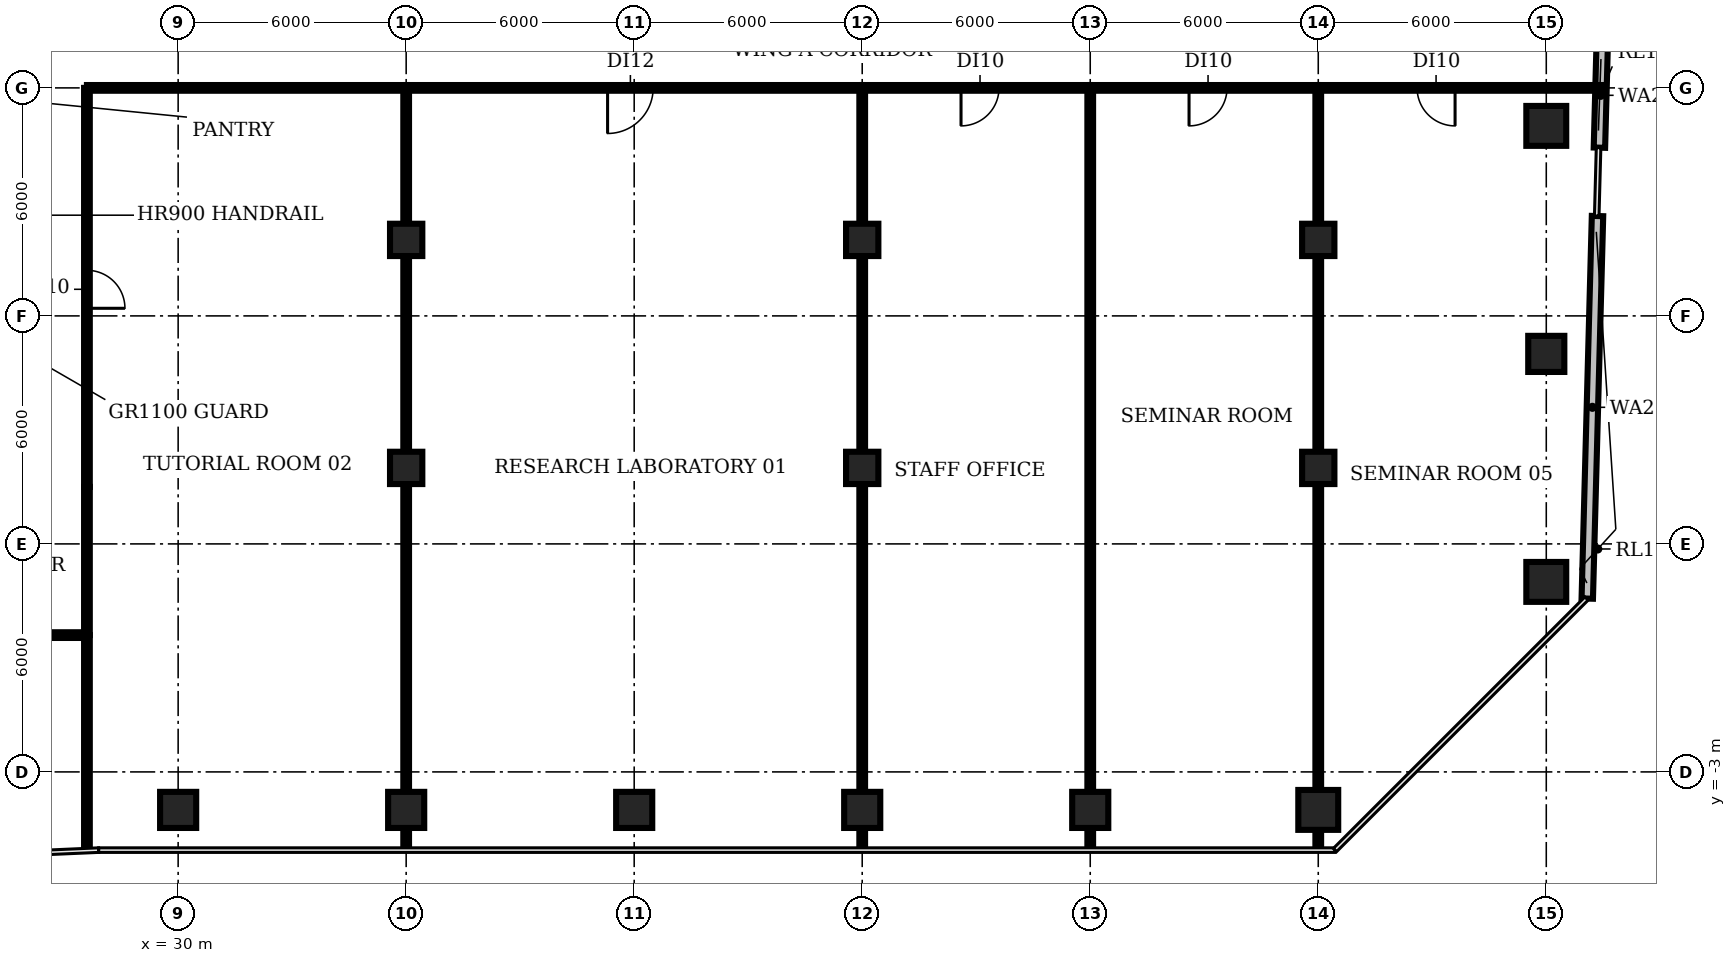
"""IFC4 building model, lengths in metres.
Left out: names, types, materials, properties, quantities, classifications, styles, units other than length and angle.
Written with IfcOpenShell. Run it as: python <this file> out.ifc"""

import sys

from ifc_helpers import new_model, si_unit, direction, frame, frame_2d, origin, origin_2d, place, context, subcontext, project, spatial, rectangle, circle, extrude, element, fill, save


model = new_model("IFC4")
c1 = context("Model", 3, precision=1e-05, world=origin(), true_north=direction((0.0, 1.0)))
c2 = subcontext(c1, "Body", "Model", "MODEL_VIEW")
j1 = project(units=[si_unit("LENGTHUNIT", "METRE"), si_unit("PLANEANGLEUNIT", "RADIAN")], contexts=[c1])
p1 = place(None, origin())
s1 = spatial("IfcSite", under=j1, at=p1, CompositionType="ELEMENT")
p2 = place(p1, origin())
s2 = spatial("IfcBuilding", under=s1, at=p2, CompositionType="ELEMENT")
p3 = place(p2, frame((0.0, 0.0, 62.6)))
s3 = spatial("IfcBuildingStorey", under=s2, at=p3, CompositionType="ELEMENT", Elevation=62.6)
for number, where, z_axis, x_axis in (
    (1, (30.0, -4.0, 0.0), (0.0, 0.0, 1.0), (1.0, 0.0, 0.0)),
    (2, (36.0, -4.0, 0.0), (0.0, 0.0, 1.0), (1.0, 0.0, 0.0)),
):
    element("IfcColumn", number, at=place(p3, frame(where, z_axis=z_axis, x_axis=x_axis)), inside=s3, PredefinedType="COLUMN", context=c2, shape_type="SweptSolid", body=[
        extrude(rectangle(XDim=0.95, YDim=0.95, at=origin_2d()), origin(), (0.0, 0.0, 1.0), 3.85),
    ])
for number, where, z_axis, x_axis in (
    (3, (36.0, 5.0, 0.0), (0.0, 0.0, 1.0), (1.0, 0.0, 0.0)),
    (4, (36.0, 11.0, 0.0), (0.0, 0.0, 1.0), (1.0, 0.0, 0.0)),
):
    element("IfcColumn", number, at=place(p3, frame(where, z_axis=z_axis, x_axis=x_axis)), inside=s3, PredefinedType="COLUMN", context=c2, shape_type="SweptSolid", body=[
        extrude(rectangle(XDim=0.85, YDim=0.85, at=origin_2d()), origin(), (0.0, 0.0, 1.0), 3.85),
    ])
for number, where, z_axis, x_axis in (
    (5, (42.0, -4.0, 0.0), (0.0, 0.0, 1.0), (1.0, 0.0, 0.0)),
    (6, (48.0, -4.0, 0.0), (0.0, 0.0, 1.0), (1.0, 0.0, 0.0)),
):
    element("IfcColumn", number, at=place(p3, frame(where, z_axis=z_axis, x_axis=x_axis)), inside=s3, PredefinedType="COLUMN", context=c2, shape_type="SweptSolid", body=[
        extrude(rectangle(XDim=0.95, YDim=0.95, at=origin_2d()), origin(), (0.0, 0.0, 1.0), 3.85),
    ])
for number, where, z_axis, x_axis in (
    (7, (48.0, 5.0, 0.0), (0.0, 0.0, 1.0), (1.0, 0.0, 0.0)),
    (8, (48.0, 11.0, 0.0), (0.0, 0.0, 1.0), (1.0, 0.0, 0.0)),
):
    element("IfcColumn", number, at=place(p3, frame(where, z_axis=z_axis, x_axis=x_axis)), inside=s3, PredefinedType="COLUMN", context=c2, shape_type="SweptSolid", body=[
        extrude(rectangle(XDim=0.85, YDim=0.85, at=origin_2d()), origin(), (0.0, 0.0, 1.0), 3.85),
    ])
p4 = place(p3, frame((54.0, -4.0, 0.0), z_axis=(0.0, 0.0, 1.0), x_axis=(1.0, 0.0, 0.0)))
e9 = element("IfcColumn", 9, at=p4, inside=s3, PredefinedType="COLUMN", context=c2, shape_type="SweptSolid", body=[
    extrude(rectangle(XDim=0.95, YDim=0.95, at=origin_2d()), origin(), (0.0, 0.0, 1.0), 3.85),
])
p5 = place(p3, frame((60.0, -4.0, 0.0), z_axis=(0.0, 0.0, 1.0), x_axis=(1.0, 0.0, 0.0)))
e10 = element("IfcColumn", 10, at=p5, inside=s3, PredefinedType="COLUMN", context=c2, shape_type="SweptSolid", body=[
    extrude(circle(Radius=0.525, at=origin_2d()), origin(), (0.0, 0.0, 1.0), 3.85),
])
for number, where, z_axis, x_axis in (
    (11, (60.0, 5.0, 0.0), (0.0, 0.0, 1.0), (1.0, 0.0, 0.0)),
    (12, (60.0, 11.0, 0.0), (0.0, 0.0, 1.0), (1.0, 0.0, 0.0)),
):
    element("IfcColumn", number, at=place(p3, frame(where, z_axis=z_axis, x_axis=x_axis)), inside=s3, PredefinedType="COLUMN", context=c2, shape_type="SweptSolid", body=[
        extrude(rectangle(XDim=0.85, YDim=0.85, at=origin_2d()), origin(), (0.0, 0.0, 1.0), 3.85),
    ])
p6 = place(p3, frame((66.0, 2.0, 0.0), z_axis=(0.0, 0.0, 1.0), x_axis=(1.0, 0.0, 0.0)))
e13 = element("IfcColumn", 13, at=p6, inside=s3, PredefinedType="COLUMN", context=c2, shape_type="SweptSolid", body=[
    extrude(circle(Radius=0.525, at=origin_2d()), origin(), (0.0, 0.0, 1.0), 3.85),
])
p7 = place(p3, frame((66.0, 8.0, 0.0), z_axis=(0.0, 0.0, 1.0), x_axis=(1.0, 0.0, 0.0)))
e14 = element("IfcColumn", 14, at=p7, inside=s3, PredefinedType="COLUMN", context=c2, shape_type="SweptSolid", body=[
    extrude(rectangle(XDim=0.95, YDim=0.95, at=origin_2d()), origin(), (0.0, 0.0, 1.0), 3.85),
])
p8 = place(p3, frame((66.0, 14.0, 0.0), z_axis=(0.0, 0.0, 1.0), x_axis=(1.0, 0.0, 0.0)))
e15 = element("IfcColumn", 15, at=p8, inside=s3, PredefinedType="COLUMN", context=c2, shape_type="SweptSolid", body=[
    extrude(circle(Radius=0.525, at=origin_2d()), origin(), (0.0, 0.0, 1.0), 3.85),
])
p9 = place(p3, frame((67.078, 1.561, 0.0), z_axis=(0.0, 0.0, 1.0), x_axis=(0.026789954372, 0.999641084762, 0.0)))
e16 = element("IfcWall", 16, at=p9, inside=s3, PredefinedType="SOLIDWALL", context=c2, shape_type="SweptSolid", body=[
    extrude(rectangle(XDim=10.07, YDim=0.3, at=frame_2d((5.035, 0.0))), origin(), (0.0, 0.0, 1.0), 3.85),
])
p10 = place(p3, frame((67.398, 13.427, 0.0), z_axis=(0.0, 0.0, 1.0), x_axis=(0.026746873039, 0.999642238395, 0.0)))
e17 = element("IfcWall", 17, at=p10, inside=s3, PredefinedType="SOLIDWALL", context=c2, shape_type="SweptSolid", body=[
    extrude(rectangle(XDim=2.757, YDim=0.3, at=frame_2d((1.378, 0.0))), origin(), (0.0, 0.0, 1.0), 3.85),
])
p11 = place(p3, frame((27.6, -5.02, 0.0), z_axis=(0.0, 0.0, 1.0), x_axis=(0.0, 1.0, 0.0)))
e18 = element("IfcWall", 18, at=p11, inside=s3, PredefinedType="PARTITIONING", context=c2, shape_type="SweptSolid", body=[
    extrude(rectangle(XDim=5.62, YDim=0.15, at=frame_2d((2.81, 0.0))), origin(), (0.0, 0.0, 1.0), 2.83),
])
p12 = place(p3, frame((27.6, 0.6, 0.0), z_axis=(0.0, 0.0, 1.0), x_axis=(-1.0, 0.0, 0.0)))
e19 = element("IfcWall", 19, at=p12, inside=s3, PredefinedType="PARTITIONING", context=c2, shape_type="SweptSolid", body=[
    extrude(rectangle(XDim=25.2, YDim=0.15, at=frame_2d((12.6, 0.0))), origin(), (0.0, 0.0, 1.0), 2.83),
])
p13 = place(p12, frame((12.1, 0.0, 0.0)))
e20 = element("IfcOpeningElement", 20, at=p13, cuts=e19, PredefinedType="OPENING", context=c2, shape_type="SweptSolid", body=[
    extrude(rectangle(XDim=1.2, YDim=2.1, at=frame_2d((0.6, 1.05))), frame((0.0, 0.085, 0.0), z_axis=(0.0, -1.0, 0.0), x_axis=(1.0, 0.0, 0.0)), (0.0, 0.0, 1.0), 0.17),
])
p14 = place(p3, frame((27.6, 0.6, 0.0), z_axis=(0.0, 0.0, 1.0), x_axis=(0.0, 1.0, 0.0)))
e21 = element("IfcWall", 21, at=p14, inside=s3, PredefinedType="PARTITIONING", context=c2, shape_type="SweptSolid", body=[
    extrude(rectangle(XDim=3.9, YDim=0.15, at=frame_2d((1.95, 0.0))), origin(), (0.0, 0.0, 1.0), 2.83),
])
p15 = place(p3, frame((27.6, 15.0, 0.0), z_axis=(0.0, 0.0, 1.0), x_axis=(0.0, -1.0, 0.0)))
e22 = element("IfcWall", 22, at=p15, inside=s3, PredefinedType="PARTITIONING", context=c2, shape_type="SweptSolid", body=[
    extrude(rectangle(XDim=10.5, YDim=0.15, at=frame_2d((5.25, 0.0))), origin(), (0.0, 0.0, 1.0), 2.83),
])
p16 = place(p15, frame((4.8, 0.0, 0.0)))
e23 = element("IfcOpeningElement", 23, at=p16, cuts=e22, PredefinedType="OPENING", context=c2, shape_type="SweptSolid", body=[
    extrude(rectangle(XDim=1.0, YDim=2.1, at=frame_2d((0.5, 1.05))), frame((0.0, 0.085, 0.0), z_axis=(0.0, -1.0, 0.0), x_axis=(1.0, 0.0, 0.0)), (0.0, 0.0, 1.0), 0.17),
])
p17 = place(p3, frame((27.6, 15.0, 0.0), z_axis=(0.0, 0.0, 1.0), x_axis=(1.0, 0.0, 0.0)))
e24 = element("IfcWall", 24, at=p17, inside=s3, PredefinedType="PARTITIONING", context=c2, shape_type="SweptSolid", body=[
    extrude(rectangle(XDim=8.4, YDim=0.15, at=frame_2d((4.2, 0.0))), origin(), (0.0, 0.0, 1.0), 2.83),
])
for number, where, z_axis, x_axis in (
    (25, (36.0, -5.01, 0.0), (0.0, 0.0, 1.0), (0.0, 1.0, 0.0)),
    (26, (48.0, -5.01, 0.0), (0.0, 0.0, 1.0), (0.0, 1.0, 0.0)),
):
    element("IfcWall", number, at=place(p3, frame(where, z_axis=z_axis, x_axis=x_axis)), inside=s3, PredefinedType="PARTITIONING", context=c2, shape_type="SweptSolid", body=[
        extrude(rectangle(XDim=20.01, YDim=0.15, at=frame_2d((10.005, 0.0))), origin(), (0.0, 0.0, 1.0), 2.83),
    ])
p18 = place(p3, frame((48.0, 15.0, 0.0), z_axis=(0.0, 0.0, 1.0), x_axis=(-1.0, 0.0, 0.0)))
e27 = element("IfcWall", 27, at=p18, inside=s3, PredefinedType="PARTITIONING", context=c2, shape_type="SweptSolid", body=[
    extrude(rectangle(XDim=12.0, YDim=0.15, at=frame_2d((6.0, 0.0))), origin(), (0.0, 0.0, 1.0), 2.83),
])
p19 = place(p18, frame((5.5, 0.0, 0.0)))
e28 = element("IfcOpeningElement", 28, at=p19, cuts=e27, PredefinedType="OPENING", context=c2, shape_type="SweptSolid", body=[
    extrude(rectangle(XDim=1.2, YDim=2.1, at=frame_2d((0.6, 1.05))), frame((0.0, 0.085, 0.0), z_axis=(0.0, -1.0, 0.0), x_axis=(1.0, 0.0, 0.0)), (0.0, 0.0, 1.0), 0.17),
])
p20 = place(p3, frame((54.0, -4.993, 0.0), z_axis=(0.0, 0.0, 1.0), x_axis=(0.0, 1.0, 0.0)))
e29 = element("IfcWall", 29, at=p20, inside=s3, PredefinedType="PARTITIONING", context=c2, shape_type="SweptSolid", body=[
    extrude(rectangle(XDim=19.993, YDim=0.15, at=frame_2d((9.997, 0.0))), origin(), (0.0, 0.0, 1.0), 2.83),
])
p21 = place(p3, frame((54.0, 15.0, 0.0), z_axis=(0.0, 0.0, 1.0), x_axis=(-1.0, 0.0, 0.0)))
e30 = element("IfcWall", 30, at=p21, inside=s3, PredefinedType="PARTITIONING", context=c2, shape_type="SweptSolid", body=[
    extrude(rectangle(XDim=6.0, YDim=0.15, at=frame_2d((3.0, 0.0))), origin(), (0.0, 0.0, 1.0), 2.83),
])
p22 = place(p21, frame((2.4, 0.0, 0.0)))
e31 = element("IfcOpeningElement", 31, at=p22, cuts=e30, PredefinedType="OPENING", context=c2, shape_type="SweptSolid", body=[
    extrude(rectangle(XDim=1.0, YDim=2.1, at=frame_2d((0.5, 1.05))), frame((0.0, 0.085, 0.0), z_axis=(0.0, -1.0, 0.0), x_axis=(1.0, 0.0, 0.0)), (0.0, 0.0, 1.0), 0.17),
])
p23 = place(p3, frame((60.0, -5.01, 0.0), z_axis=(0.0, 0.0, 1.0), x_axis=(0.0, 1.0, 0.0)))
e32 = element("IfcWall", 32, at=p23, inside=s3, PredefinedType="PARTITIONING", context=c2, shape_type="SweptSolid", body=[
    extrude(rectangle(XDim=20.01, YDim=0.15, at=frame_2d((10.005, 0.0))), origin(), (0.0, 0.0, 1.0), 2.83),
])
p24 = place(p3, frame((60.0, 15.0, 0.0), z_axis=(0.0, 0.0, 1.0), x_axis=(-1.0, 0.0, 0.0)))
e33 = element("IfcWall", 33, at=p24, inside=s3, PredefinedType="PARTITIONING", context=c2, shape_type="SweptSolid", body=[
    extrude(rectangle(XDim=6.0, YDim=0.15, at=frame_2d((3.0, 0.0))), origin(), (0.0, 0.0, 1.0), 2.83),
])
p25 = place(p24, frame((2.4, 0.0, 0.0)))
e34 = element("IfcOpeningElement", 34, at=p25, cuts=e33, PredefinedType="OPENING", context=c2, shape_type="SweptSolid", body=[
    extrude(rectangle(XDim=1.0, YDim=2.1, at=frame_2d((0.5, 1.05))), frame((0.0, 0.085, 0.0), z_axis=(0.0, -1.0, 0.0), x_axis=(1.0, 0.0, 0.0)), (0.0, 0.0, 1.0), 0.17),
])
p26 = place(p3, frame((67.478, 15.0, 0.0), z_axis=(0.0, 0.0, 1.0), x_axis=(-1.0, 0.0, 0.0)))
e35 = element("IfcWall", 35, at=p26, inside=s3, PredefinedType="PARTITIONING", context=c2, shape_type="SweptSolid", body=[
    extrude(rectangle(XDim=7.478, YDim=0.15, at=frame_2d((3.739, 0.0))), origin(), (0.0, 0.0, 1.0), 2.83),
])
p27 = place(p26, frame((3.878, 0.0, 0.0)))
e36 = element("IfcOpeningElement", 36, at=p27, cuts=e35, PredefinedType="OPENING", context=c2, shape_type="SweptSolid", body=[
    extrude(rectangle(XDim=1.0, YDim=2.1, at=frame_2d((0.5, 1.05))), frame((0.0, 0.085, 0.0), z_axis=(0.0, -1.0, 0.0), x_axis=(1.0, 0.0, 0.0)), (0.0, 0.0, 1.0), 0.17),
])
p28 = place(p16, origin())
e37 = element("IfcDoor", 37, at=p28, inside=s3, OperationType="SINGLE_SWING_RIGHT", PredefinedType="DOOR", context=c2, shape_type="SweptSolid", body=[
    extrude(rectangle(XDim=1.0, YDim=2.1, at=frame_2d((0.5, 1.05))), frame((0.0, 0.025, 0.0), z_axis=(0.0, -1.0, 0.0), x_axis=(1.0, 0.0, 0.0)), (0.0, 0.0, 1.0), 0.05),
])
fill(e23, e37)
p29 = place(p19, origin())
e38 = element("IfcDoor", 38, at=p29, inside=s3, OperationType="SINGLE_SWING_RIGHT", PredefinedType="DOOR", context=c2, shape_type="SweptSolid", body=[
    extrude(rectangle(XDim=1.2, YDim=2.1, at=frame_2d((0.6, 1.05))), frame((0.0, 0.025, 0.0), z_axis=(0.0, -1.0, 0.0), x_axis=(1.0, 0.0, 0.0)), (0.0, 0.0, 1.0), 0.05),
])
fill(e28, e38)
p30 = place(p22, origin())
e39 = element("IfcDoor", 39, at=p30, inside=s3, OperationType="SINGLE_SWING_RIGHT", PredefinedType="DOOR", context=c2, shape_type="SweptSolid", body=[
    extrude(rectangle(XDim=1.0, YDim=2.1, at=frame_2d((0.5, 1.05))), frame((0.0, 0.025, 0.0), z_axis=(0.0, -1.0, 0.0), x_axis=(1.0, 0.0, 0.0)), (0.0, 0.0, 1.0), 0.05),
])
fill(e31, e39)
p31 = place(p25, origin())
e40 = element("IfcDoor", 40, at=p31, inside=s3, OperationType="SINGLE_SWING_RIGHT", PredefinedType="DOOR", context=c2, shape_type="SweptSolid", body=[
    extrude(rectangle(XDim=1.0, YDim=2.1, at=frame_2d((0.5, 1.05))), frame((0.0, 0.025, 0.0), z_axis=(0.0, -1.0, 0.0), x_axis=(1.0, 0.0, 0.0)), (0.0, 0.0, 1.0), 0.05),
])
fill(e34, e40)
p32 = place(p27, origin())
e41 = element("IfcDoor", 41, at=p32, inside=s3, OperationType="SINGLE_SWING_LEFT", PredefinedType="DOOR", context=c2, shape_type="SweptSolid", body=[
    extrude(rectangle(XDim=1.0, YDim=2.1, at=frame_2d((0.5, 1.05))), frame((0.0, 0.025, 0.0), z_axis=(0.0, -1.0, 0.0), x_axis=(1.0, 0.0, 0.0)), (0.0, 0.0, 1.0), 0.05),
])
fill(e36, e41)
save(model, sys.argv[1])
